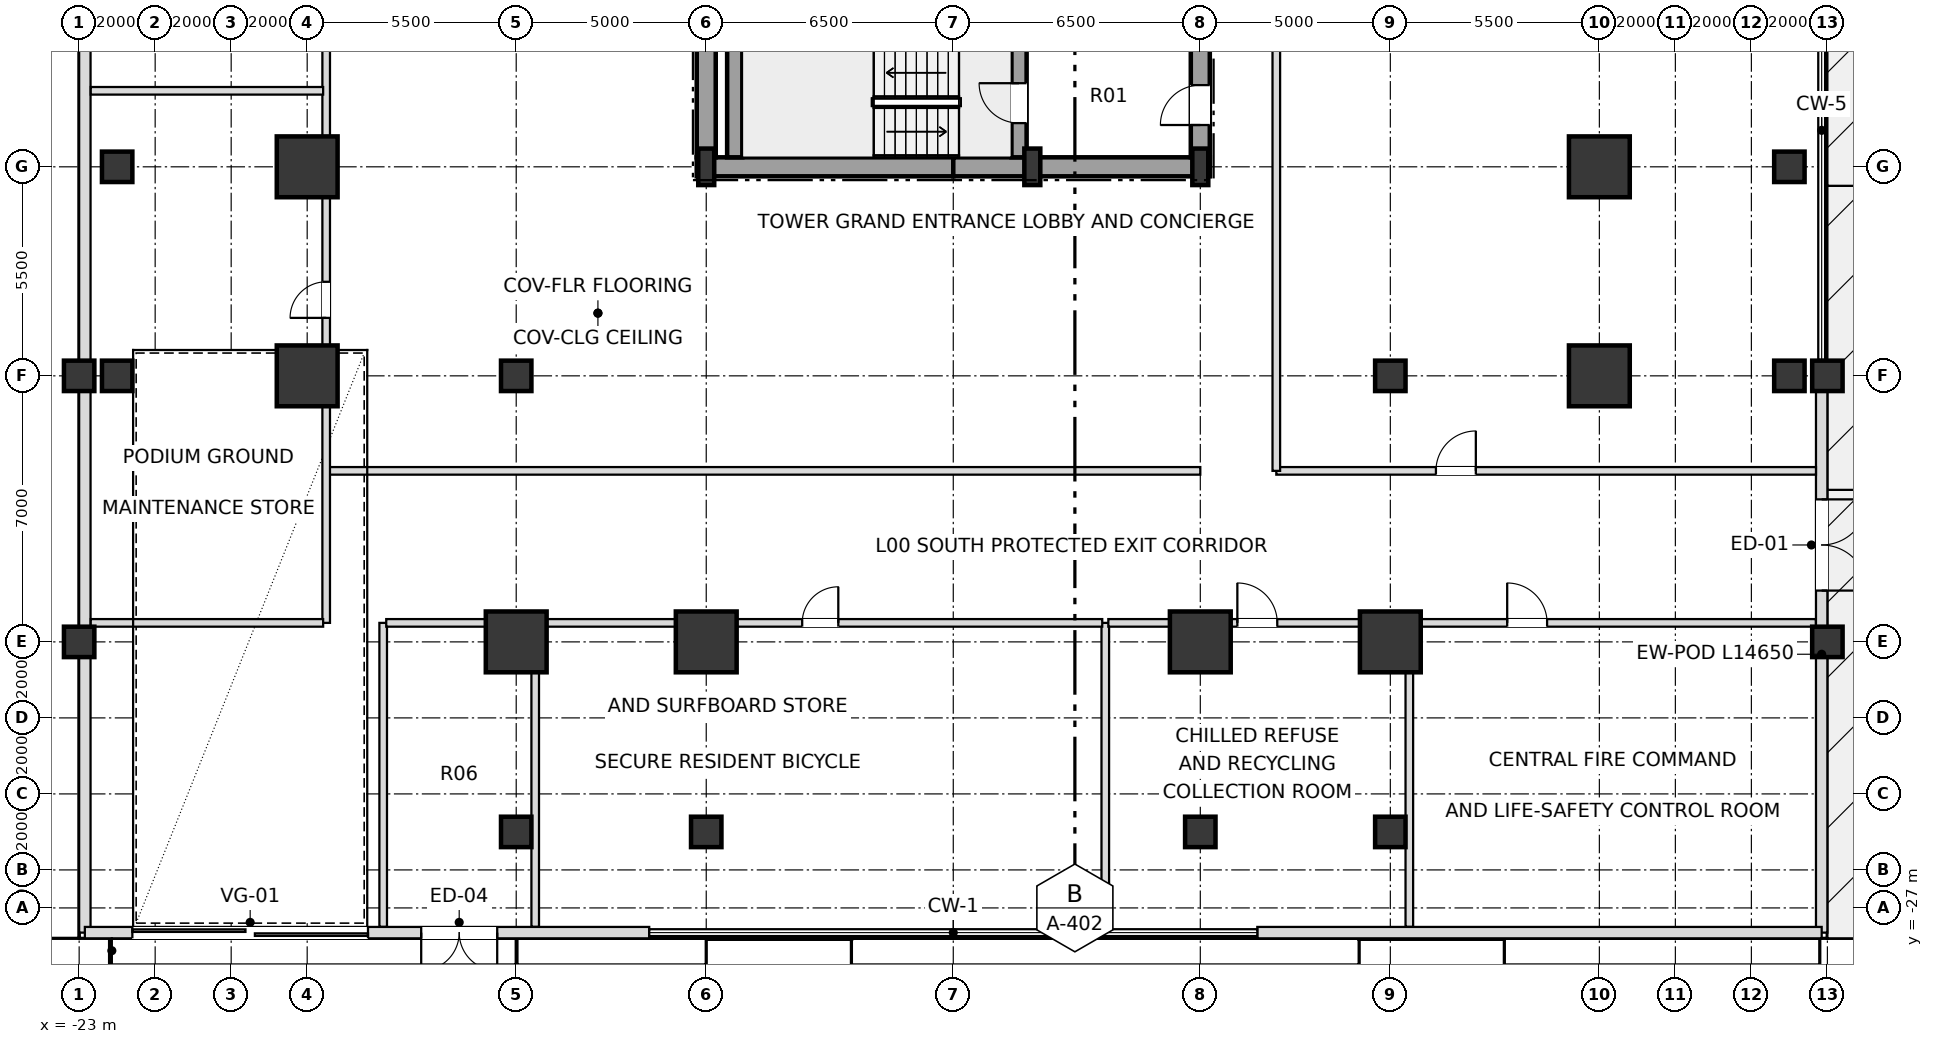
"""IFC4 building model, lengths in metres.
Left out: names, types, materials, properties, quantities, classifications, styles, units other than length and angle.
Written with IfcOpenShell. Run it as: python <this file> out.ifc"""

import sys

from ifc_helpers import new_model, si_unit, direction, frame, frame_2d, origin, origin_2d, place, context, subcontext, project, spatial, rectangle, i_section, extrude, element, fill, save


model = new_model("IFC4")
c1 = context("Model", 3, precision=1e-05, world=origin(), true_north=direction((0.0, 1.0)))
c2 = subcontext(c1, "Body", "Model", "MODEL_VIEW")
j1 = project(units=[si_unit("LENGTHUNIT", "METRE"), si_unit("PLANEANGLEUNIT", "RADIAN")], contexts=[c1])
p1 = place(None, origin())
s1 = spatial("IfcSite", under=j1, at=p1, CompositionType="ELEMENT")
p2 = place(p1, origin())
s2 = spatial("IfcBuilding", under=s1, at=p2, CompositionType="ELEMENT")
p3 = place(p2, origin())
s3 = spatial("IfcBuildingStorey", under=s2, at=p3, CompositionType="ELEMENT", Elevation=0.0)
for number, where, z_axis, x_axis in (
    (1, (-6.5, -7.5, 0.0), (0.0, 0.0, 1.0), (1.0, 0.0, 0.0)),
    (2, (2.08, -7.5, 0.0), (0.0, 0.0, 1.0), (1.0, 0.0, 0.0)),
    (3, (6.5, -7.5, 0.0), (0.0, 0.0, 1.0), (1.0, 0.0, 0.0)),
):
    element("IfcColumn", number, at=place(p3, frame(where, z_axis=z_axis, x_axis=x_axis)), inside=s3, PredefinedType="COLUMN", context=c2, shape_type="SweptSolid", body=[
        extrude(i_section(OverallWidth=0.42, OverallDepth=0.96, WebThickness=0.022, FlangeThickness=0.034, at=origin_2d()), origin(), (0.0, 0.0, 1.0), 6.0),
    ])
for number, where, z_axis, x_axis in (
    (4, (-11.5, -20.0, 0.0), (0.0, 0.0, 1.0), (1.0, 0.0, 0.0)),
    (5, (-6.5, -20.0, 0.0), (0.0, 0.0, 1.0), (1.0, 0.0, 0.0)),
    (6, (6.5, -20.0, 0.0), (0.0, 0.0, 1.0), (1.0, 0.0, 0.0)),
    (7, (11.5, -20.0, 0.0), (0.0, 0.0, 1.0), (1.0, 0.0, 0.0)),
    (8, (17.0, -13.0, 0.0), (0.0, 0.0, 1.0), (1.0, 0.0, 0.0)),
    (9, (17.0, -7.5, 0.0), (0.0, 0.0, 1.0), (1.0, 0.0, 0.0)),
    (10, (-17.0, -7.5, 0.0), (0.0, 0.0, 1.0), (1.0, 0.0, 0.0)),
    (11, (-17.0, -13.0, 0.0), (0.0, 0.0, 1.0), (1.0, 0.0, 0.0)),
):
    element("IfcColumn", number, at=place(p3, frame(where, z_axis=z_axis, x_axis=x_axis)), inside=s3, PredefinedType="USERDEFINED", context=c2, shape_type="SweptSolid", body=[
        extrude(rectangle(XDim=1.6, YDim=1.6, at=origin_2d()), origin(), (0.0, 0.0, 1.0), 6.0),
    ])
for number, where, z_axis, x_axis in (
    (12, (-23.0, -20.0, 0.0), (0.0, 0.0, 1.0), (1.0, 0.0, 0.0)),
    (13, (-23.0, -13.0, 0.0), (0.0, 0.0, 1.0), (1.0, 0.0, 0.0)),
    (14, (23.0, -20.0, 0.0), (0.0, 0.0, 1.0), (1.0, 0.0, 0.0)),
    (15, (23.0, -13.0, 0.0), (0.0, 0.0, 1.0), (1.0, 0.0, 0.0)),
    (16, (-11.5, -13.0, 0.0), (0.0, 0.0, 1.0), (1.0, 0.0, 0.0)),
    (17, (11.5, -13.0, 0.0), (0.0, 0.0, 1.0), (1.0, 0.0, 0.0)),
    (18, (-11.5, -25.0, 0.0), (0.0, 0.0, 1.0), (1.0, 0.0, 0.0)),
    (19, (-6.5, -25.0, 0.0), (0.0, 0.0, 1.0), (1.0, 0.0, 0.0)),
    (20, (6.5, -25.0, 0.0), (0.0, 0.0, 1.0), (1.0, 0.0, 0.0)),
    (21, (11.5, -25.0, 0.0), (0.0, 0.0, 1.0), (1.0, 0.0, 0.0)),
    (22, (-22.0, -13.0, 0.0), (0.0, 0.0, 1.0), (1.0, 0.0, 0.0)),
    (23, (-22.0, -7.5, 0.0), (0.0, 0.0, 1.0), (1.0, 0.0, 0.0)),
    (24, (22.0, -13.0, 0.0), (0.0, 0.0, 1.0), (1.0, 0.0, 0.0)),
    (25, (22.0, -7.5, 0.0), (0.0, 0.0, 1.0), (1.0, 0.0, 0.0)),
):
    element("IfcColumn", number, at=place(p3, frame(where, z_axis=z_axis, x_axis=x_axis)), inside=s3, PredefinedType="COLUMN", context=c2, shape_type="SweptSolid", body=[
        extrude(rectangle(XDim=0.8, YDim=0.8, at=origin_2d()), origin(), (0.0, 0.0, 1.0), 6.0),
    ])
p4 = place(p3, frame((-22.85, 27.65, 0.0), z_axis=(0.0, 0.0, 1.0), x_axis=(0.0, -1.0, 0.0)))
e26 = element("IfcWall", 26, at=p4, inside=s3, PredefinedType="SOLIDWALL", context=c2, shape_type="SweptSolid", body=[
    extrude(rectangle(XDim=55.3, YDim=0.3, at=frame_2d((27.65, 0.0))), origin(), (0.0, 0.0, 1.0), 5.076),
])
p5 = place(p4, frame((21.0, 0.0, 0.0)))
e27 = element("IfcOpeningElement", 27, at=p5, cuts=e26, PredefinedType="OPENING", context=c2, shape_type="SweptSolid", body=[
    extrude(rectangle(XDim=4.2, YDim=3.4, at=frame_2d((2.1, 1.7))), frame((0.0, 0.16, 0.0), z_axis=(0.0, -1.0, 0.0), x_axis=(1.0, 0.0, 0.0)), (0.0, 0.0, 1.0), 0.32),
])
p6 = place(p3, frame((22.85, -13.0, 0.0), z_axis=(0.0, 0.0, 1.0), x_axis=(0.0, -1.0, 0.0)))
e28 = element("IfcWall", 28, at=p6, inside=s3, PredefinedType="SOLIDWALL", context=c2, shape_type="SweptSolid", body=[
    extrude(rectangle(XDim=14.65, YDim=0.3, at=frame_2d((7.325, 0.0))), origin(), (0.0, 0.0, 1.0), 5.076),
])
p7 = place(p6, frame((3.25, 0.0, 0.0)))
e29 = element("IfcOpeningElement", 29, at=p7, cuts=e28, PredefinedType="OPENING", context=c2, shape_type="SweptSolid", body=[
    extrude(rectangle(XDim=2.4, YDim=2.6, at=frame_2d((1.2, 1.3))), frame((0.0, 0.16, 0.0), z_axis=(0.0, -1.0, 0.0), x_axis=(1.0, 0.0, 0.0)), (0.0, 0.0, 1.0), 0.32),
])
p8 = place(p3, frame((-8.0, -27.65, 0.0), z_axis=(0.0, 0.0, 1.0), x_axis=(-1.0, 0.0, 0.0)))
e30 = element("IfcWall", 30, at=p8, inside=s3, PredefinedType="SOLIDWALL", context=c2, shape_type="SweptSolid", body=[
    extrude(rectangle(XDim=14.85, YDim=0.3, at=frame_2d((7.425, 0.0))), origin(), (0.0, 0.0, 1.0), 5.72),
])
p9 = place(p8, frame((4.0, 0.0, 0.0)))
e31 = element("IfcOpeningElement", 31, at=p9, cuts=e30, PredefinedType="OPENING", context=c2, shape_type="SweptSolid", body=[
    extrude(rectangle(XDim=2.0, YDim=2.2, at=frame_2d((1.0, 1.1))), frame((0.0, 0.16, 0.0), z_axis=(0.0, -1.0, 0.0), x_axis=(1.0, 0.0, 0.0)), (0.0, 0.0, 1.0), 0.32),
])
p10 = place(p8, frame((7.4, 0.0, 0.0)))
e32 = element("IfcOpeningElement", 32, at=p10, cuts=e30, PredefinedType="OPENING", context=c2, shape_type="SweptSolid", body=[
    extrude(rectangle(XDim=6.2, YDim=2.8, at=frame_2d((3.1, 1.4))), frame((0.0, 0.16, 0.0), z_axis=(0.0, -1.0, 0.0), x_axis=(1.0, 0.0, 0.0)), (0.0, 0.0, 1.0), 0.32),
])
p11 = place(p3, frame((22.85, -27.65, 0.0), z_axis=(0.0, 0.0, 1.0), x_axis=(-1.0, 0.0, 0.0)))
e33 = element("IfcWall", 33, at=p11, inside=s3, PredefinedType="SOLIDWALL", context=c2, shape_type="SweptSolid", body=[
    extrude(rectangle(XDim=14.85, YDim=0.3, at=frame_2d((7.425, 0.0))), origin(), (0.0, 0.0, 1.0), 5.72),
])
for number, where, z_axis, x_axis in (
    (34, (-6.75, -7.5, 0.0), (0.0, 0.0, 1.0), (1.0, 0.0, 0.0)),
    (35, (0.0, -7.5, 0.0), (0.0, 0.0, 1.0), (1.0, 0.0, 0.0)),
):
    element("IfcWall", number, at=place(p3, frame(where, z_axis=z_axis, x_axis=x_axis)), inside=s3, PredefinedType="SHEAR", context=c2, shape_type="SweptSolid", body=[
        extrude(rectangle(XDim=6.75, YDim=0.5, at=frame_2d((3.375, 0.0))), origin(), (0.0, 0.0, 1.0), 5.72),
    ])
p12 = place(p3, frame((-6.5, -7.25, 0.0), z_axis=(0.0, 0.0, 1.0), x_axis=(0.0, 1.0, 0.0)))
e36 = element("IfcWall", 36, at=p12, inside=s3, PredefinedType="SHEAR", context=c2, shape_type="SweptSolid", body=[
    extrude(rectangle(XDim=3.55, YDim=0.5, at=frame_2d((1.775, 0.0))), origin(), (0.0, 0.0, 1.0), 5.72),
])
p13 = place(p3, frame((6.5, -7.25, 0.0), z_axis=(0.0, 0.0, 1.0), x_axis=(0.0, 1.0, 0.0)))
e37 = element("IfcWall", 37, at=p13, inside=s3, PredefinedType="SHEAR", context=c2, shape_type="SweptSolid", body=[
    extrude(rectangle(XDim=5.75, YDim=0.5, at=frame_2d((2.875, 0.0))), origin(), (0.0, 0.0, 1.0), 5.72),
])
p14 = place(p13, frame((0.85, 0.0, 0.0)))
e38 = element("IfcOpeningElement", 38, at=p14, cuts=e37, PredefinedType="OPENING", context=c2, shape_type="SweptSolid", body=[
    extrude(rectangle(XDim=1.05, YDim=2.15, at=frame_2d((0.525, 1.075))), frame((0.0, 0.26, 0.0), z_axis=(0.0, -1.0, 0.0), x_axis=(1.0, 0.0, 0.0)), (0.0, 0.0, 1.0), 0.52),
])
p15 = place(p3, frame((-5.75, -7.25, 0.0), z_axis=(0.0, 0.0, 1.0), x_axis=(0.0, 1.0, 0.0)))
e39 = element("IfcWall", 39, at=p15, inside=s3, PredefinedType="SHEAR", context=c2, shape_type="SweptSolid", body=[
    extrude(rectangle(XDim=2.9, YDim=0.4, at=frame_2d((1.45, 0.0))), origin(), (0.0, 0.0, 1.0), 5.72),
])
p16 = place(p3, frame((1.73, -7.25, 0.0), z_axis=(0.0, 0.0, 1.0), x_axis=(0.0, 1.0, 0.0)))
e40 = element("IfcWall", 40, at=p16, inside=s3, PredefinedType="SHEAR", context=c2, shape_type="SweptSolid", body=[
    extrude(rectangle(XDim=3.3, YDim=0.4, at=frame_2d((1.65, 0.0))), origin(), (0.0, 0.0, 1.0), 5.72),
])
p17 = place(p16, frame((0.9, 0.0, 0.0)))
e41 = element("IfcOpeningElement", 41, at=p17, cuts=e40, PredefinedType="OPENING", context=c2, shape_type="SweptSolid", body=[
    extrude(rectangle(XDim=1.05, YDim=2.15, at=frame_2d((0.525, 1.075))), frame((0.0, 0.21, 0.0), z_axis=(0.0, -1.0, 0.0), x_axis=(1.0, 0.0, 0.0)), (0.0, 0.0, 1.0), 0.42),
])
p18 = place(p3, frame((-16.5, -15.5, 0.0), z_axis=(0.0, 0.0, 1.0), x_axis=(1.0, 0.0, 0.0)))
e42 = element("IfcWall", 42, at=p18, inside=s3, PredefinedType="SOLIDWALL", context=c2, shape_type="SweptSolid", body=[
    extrude(rectangle(XDim=23.0, YDim=0.2, at=frame_2d((11.5, 0.0))), origin(), (0.0, 0.0, 1.0), 5.01),
])
p19 = place(p3, frame((8.5, -15.5, 0.0), z_axis=(0.0, 0.0, 1.0), x_axis=(1.0, 0.0, 0.0)))
e43 = element("IfcWall", 43, at=p19, inside=s3, PredefinedType="SOLIDWALL", context=c2, shape_type="SweptSolid", body=[
    extrude(rectangle(XDim=14.2, YDim=0.2, at=frame_2d((7.1, 0.0))), origin(), (0.0, 0.0, 1.0), 5.01),
])
p20 = place(p19, frame((4.2, 0.0, 0.0)))
e44 = element("IfcOpeningElement", 44, at=p20, cuts=e43, PredefinedType="OPENING", context=c2, shape_type="SweptSolid", body=[
    extrude(rectangle(XDim=1.05, YDim=2.15, at=frame_2d((0.525, 1.075))), frame((0.0, 0.11, 0.0), z_axis=(0.0, -1.0, 0.0), x_axis=(1.0, 0.0, 0.0)), (0.0, 0.0, 1.0), 0.22),
])
p21 = place(p3, frame((8.5, -15.5, 0.0), z_axis=(0.0, 0.0, 1.0), x_axis=(0.0, 1.0, 0.0)))
e45 = element("IfcWall", 45, at=p21, inside=s3, PredefinedType="SOLIDWALL", context=c2, shape_type="SweptSolid", body=[
    extrude(rectangle(XDim=11.5, YDim=0.2, at=frame_2d((5.75, 0.0))), origin(), (0.0, 0.0, 1.0), 5.01),
])
p22 = place(p3, frame((-16.5, -19.5, 0.0), z_axis=(0.0, 0.0, 1.0), x_axis=(0.0, 1.0, 0.0)))
e46 = element("IfcWall", 46, at=p22, inside=s3, PredefinedType="SOLIDWALL", context=c2, shape_type="SweptSolid", body=[
    extrude(rectangle(XDim=39.0, YDim=0.2, at=frame_2d((19.5, 0.0))), origin(), (0.0, 0.0, 1.0), 5.01),
])
p23 = place(p22, frame((20.975, 0.0, 0.0)))
e47 = element("IfcOpeningElement", 47, at=p23, cuts=e46, PredefinedType="OPENING", context=c2, shape_type="SweptSolid", body=[
    extrude(rectangle(XDim=1.05, YDim=2.15, at=frame_2d((0.525, 1.075))), frame((0.0, 0.11, 0.0), z_axis=(0.0, -1.0, 0.0), x_axis=(1.0, 0.0, 0.0)), (0.0, 0.0, 1.0), 0.22),
])
p24 = place(p22, frame((8.025, 0.0, 0.0)))
e48 = element("IfcOpeningElement", 48, at=p24, cuts=e46, PredefinedType="OPENING", context=c2, shape_type="SweptSolid", body=[
    extrude(rectangle(XDim=0.95, YDim=2.15, at=frame_2d((0.475, 1.075))), frame((0.0, 0.11, 0.0), z_axis=(0.0, -1.0, 0.0), x_axis=(1.0, 0.0, 0.0)), (0.0, 0.0, 1.0), 0.22),
])
p25 = place(p22, frame((33.475, 0.0, 0.0)))
e49 = element("IfcOpeningElement", 49, at=p25, cuts=e46, PredefinedType="OPENING", context=c2, shape_type="SweptSolid", body=[
    extrude(rectangle(XDim=1.05, YDim=2.15, at=frame_2d((0.525, 1.075))), frame((0.0, 0.11, 0.0), z_axis=(0.0, -1.0, 0.0), x_axis=(1.0, 0.0, 0.0)), (0.0, 0.0, 1.0), 0.22),
])
for number, where, z_axis, x_axis in (
    (50, (-15.0, -27.495, 0.0), (0.0, 0.0, 1.0), (0.0, 1.0, 0.0)),
    (51, (-11.0, -27.495, 0.0), (0.0, 0.0, 1.0), (0.0, 1.0, 0.0)),
):
    element("IfcWall", number, at=place(p3, frame(where, z_axis=z_axis, x_axis=x_axis)), inside=s3, PredefinedType="SOLIDWALL", context=c2, shape_type="SweptSolid", body=[
        extrude(rectangle(XDim=7.995, YDim=0.2, at=frame_2d((3.998, 0.0))), origin(), (0.0, 0.0, 1.0), 5.076),
    ])
p26 = place(p3, frame((4.0, -27.555, 0.0), z_axis=(0.0, 0.0, 1.0), x_axis=(0.0, 1.0, 0.0)))
e52 = element("IfcWall", 52, at=p26, inside=s3, PredefinedType="SOLIDWALL", context=c2, shape_type="SweptSolid", body=[
    extrude(rectangle(XDim=8.055, YDim=0.2, at=frame_2d((4.027, 0.0))), origin(), (0.0, 0.0, 1.0), 5.076),
])
p27 = place(p3, frame((12.0, -27.495, 0.0), z_axis=(0.0, 0.0, 1.0), x_axis=(0.0, 1.0, 0.0)))
e53 = element("IfcWall", 53, at=p27, inside=s3, PredefinedType="SOLIDWALL", context=c2, shape_type="SweptSolid", body=[
    extrude(rectangle(XDim=7.995, YDim=0.2, at=frame_2d((3.998, 0.0))), origin(), (0.0, 0.0, 1.0), 5.076),
])
p28 = place(p3, frame((-22.695, -19.5, 0.0), z_axis=(0.0, 0.0, 1.0), x_axis=(1.0, 0.0, 0.0)))
e54 = element("IfcWall", 54, at=p28, inside=s3, PredefinedType="SOLIDWALL", context=c2, shape_type="SweptSolid", body=[
    extrude(rectangle(XDim=6.115, YDim=0.2, at=frame_2d((3.058, 0.0))), origin(), (0.0, 0.0, 1.0), 5.72),
])
p29 = place(p3, frame((-14.92, -19.5, 0.0), z_axis=(0.0, 0.0, 1.0), x_axis=(1.0, 0.0, 0.0)))
e55 = element("IfcWall", 55, at=p29, inside=s3, PredefinedType="SOLIDWALL", context=c2, shape_type="SweptSolid", body=[
    extrude(rectangle(XDim=3.84, YDim=0.2, at=frame_2d((1.92, 0.0))), origin(), (0.0, 0.0, 1.0), 5.72),
])
p30 = place(p3, frame((-10.92, -19.5, 0.0), z_axis=(0.0, 0.0, 1.0), x_axis=(1.0, 0.0, 0.0)))
e56 = element("IfcWall", 56, at=p30, inside=s3, PredefinedType="SOLIDWALL", context=c2, shape_type="SweptSolid", body=[
    extrude(rectangle(XDim=14.84, YDim=0.2, at=frame_2d((7.42, 0.0))), origin(), (0.0, 0.0, 1.0), 5.01),
])
p31 = place(p30, frame((6.945, 0.0, 0.0)))
e57 = element("IfcOpeningElement", 57, at=p31, cuts=e56, PredefinedType="OPENING", context=c2, shape_type="SweptSolid", body=[
    extrude(rectangle(XDim=0.95, YDim=2.15, at=frame_2d((0.475, 1.075))), frame((0.0, 0.11, 0.0), z_axis=(0.0, -1.0, 0.0), x_axis=(1.0, 0.0, 0.0)), (0.0, 0.0, 1.0), 0.22),
])
p32 = place(p3, frame((4.08, -19.5, 0.0), z_axis=(0.0, 0.0, 1.0), x_axis=(1.0, 0.0, 0.0)))
e58 = element("IfcWall", 58, at=p32, inside=s3, PredefinedType="SOLIDWALL", context=c2, shape_type="SweptSolid", body=[
    extrude(rectangle(XDim=7.84, YDim=0.2, at=frame_2d((3.92, 0.0))), origin(), (0.0, 0.0, 1.0), 5.01),
])
p33 = place(p32, frame((3.395, 0.0, 0.0)))
e59 = element("IfcOpeningElement", 59, at=p33, cuts=e58, PredefinedType="OPENING", context=c2, shape_type="SweptSolid", body=[
    extrude(rectangle(XDim=1.05, YDim=2.15, at=frame_2d((0.525, 1.075))), frame((0.0, 0.11, 0.0), z_axis=(0.0, -1.0, 0.0), x_axis=(1.0, 0.0, 0.0)), (0.0, 0.0, 1.0), 0.22),
])
p34 = place(p3, frame((12.08, -19.5, 0.0), z_axis=(0.0, 0.0, 1.0), x_axis=(1.0, 0.0, 0.0)))
e60 = element("IfcWall", 60, at=p34, inside=s3, PredefinedType="SOLIDWALL", context=c2, shape_type="SweptSolid", body=[
    extrude(rectangle(XDim=10.615, YDim=0.2, at=frame_2d((5.308, 0.0))), origin(), (0.0, 0.0, 1.0), 5.72),
])
p35 = place(p34, frame((2.495, 0.0, 0.0)))
e61 = element("IfcOpeningElement", 61, at=p35, cuts=e60, PredefinedType="OPENING", context=c2, shape_type="SweptSolid", body=[
    extrude(rectangle(XDim=1.05, YDim=2.15, at=frame_2d((0.525, 1.075))), frame((0.0, 0.11, 0.0), z_axis=(0.0, -1.0, 0.0), x_axis=(1.0, 0.0, 0.0)), (0.0, 0.0, 1.0), 0.22),
])
p36 = place(p3, frame((-22.695, -5.5, 0.0), z_axis=(0.0, 0.0, 1.0), x_axis=(1.0, 0.0, 0.0)))
e62 = element("IfcWall", 62, at=p36, inside=s3, PredefinedType="SOLIDWALL", context=c2, shape_type="SweptSolid", body=[
    extrude(rectangle(XDim=6.115, YDim=0.2, at=frame_2d((3.058, 0.0))), origin(), (0.0, 0.0, 1.0), 5.01),
])
p37 = place(p7, origin())
e63 = element("IfcDoor", 63, at=p37, inside=s3, OperationType="DOUBLE_DOOR_SINGLE_SWING", PredefinedType="DOOR", context=c2, shape_type="SweptSolid", body=[
    extrude(rectangle(XDim=2.4, YDim=2.6, at=frame_2d((1.2, 1.3))), frame((0.0, 0.025, 0.0), z_axis=(0.0, -1.0, 0.0), x_axis=(1.0, 0.0, 0.0)), (0.0, 0.0, 1.0), 0.05),
])
fill(e29, e63)
p38 = place(p9, origin())
e64 = element("IfcDoor", 64, at=p38, inside=s3, OperationType="DOUBLE_DOOR_SINGLE_SWING", PredefinedType="DOOR", context=c2, shape_type="SweptSolid", body=[
    extrude(rectangle(XDim=2.0, YDim=2.2, at=frame_2d((1.0, 1.1))), frame((0.0, 0.025, 0.0), z_axis=(0.0, -1.0, 0.0), x_axis=(1.0, 0.0, 0.0)), (0.0, 0.0, 1.0), 0.05),
])
fill(e31, e64)
p39 = place(p10, origin())
e65 = element("IfcDoor", 65, at=p39, inside=s3, OperationType="ROLLINGUP", PredefinedType="GATE", context=c2, shape_type="SweptSolid", body=[
    extrude(rectangle(XDim=6.2, YDim=2.8, at=frame_2d((3.1, 1.4))), frame((0.0, 0.025, 0.0), z_axis=(0.0, -1.0, 0.0), x_axis=(1.0, 0.0, 0.0)), (0.0, 0.0, 1.0), 0.05),
])
fill(e32, e65)
p40 = place(p14, origin())
e66 = element("IfcDoor", 66, at=p40, inside=s3, OperationType="SINGLE_SWING_LEFT", PredefinedType="DOOR", context=c2, shape_type="SweptSolid", body=[
    extrude(rectangle(XDim=1.05, YDim=2.15, at=frame_2d((0.525, 1.075))), frame((0.0, 0.025, 0.0), z_axis=(0.0, -1.0, 0.0), x_axis=(1.0, 0.0, 0.0)), (0.0, 0.0, 1.0), 0.05),
])
fill(e38, e66)
p41 = place(p17, origin())
e67 = element("IfcDoor", 67, at=p41, inside=s3, OperationType="SINGLE_SWING_RIGHT", PredefinedType="DOOR", context=c2, shape_type="SweptSolid", body=[
    extrude(rectangle(XDim=1.05, YDim=2.15, at=frame_2d((0.525, 1.075))), frame((0.0, 0.025, 0.0), z_axis=(0.0, -1.0, 0.0), x_axis=(1.0, 0.0, 0.0)), (0.0, 0.0, 1.0), 0.05),
])
fill(e41, e67)
p42 = place(p20, origin())
e68 = element("IfcDoor", 68, at=p42, inside=s3, OperationType="SINGLE_SWING_RIGHT", PredefinedType="DOOR", context=c2, shape_type="SweptSolid", body=[
    extrude(rectangle(XDim=1.05, YDim=2.15, at=frame_2d((0.525, 1.075))), frame((0.0, 0.025, 0.0), z_axis=(0.0, -1.0, 0.0), x_axis=(1.0, 0.0, 0.0)), (0.0, 0.0, 1.0), 0.05),
])
fill(e44, e68)
p43 = place(p35, origin())
e69 = element("IfcDoor", 69, at=p43, inside=s3, OperationType="SINGLE_SWING_LEFT", PredefinedType="DOOR", context=c2, shape_type="SweptSolid", body=[
    extrude(rectangle(XDim=1.05, YDim=2.15, at=frame_2d((0.525, 1.075))), frame((0.0, 0.025, 0.0), z_axis=(0.0, -1.0, 0.0), x_axis=(1.0, 0.0, 0.0)), (0.0, 0.0, 1.0), 0.05),
])
fill(e61, e69)
p44 = place(p31, origin())
e70 = element("IfcDoor", 70, at=p44, inside=s3, OperationType="SINGLE_SWING_RIGHT", PredefinedType="DOOR", context=c2, shape_type="SweptSolid", body=[
    extrude(rectangle(XDim=0.95, YDim=2.15, at=frame_2d((0.475, 1.075))), frame((0.0, 0.025, 0.0), z_axis=(0.0, -1.0, 0.0), x_axis=(1.0, 0.0, 0.0)), (0.0, 0.0, 1.0), 0.05),
])
fill(e57, e70)
p45 = place(p33, origin())
e71 = element("IfcDoor", 71, at=p45, inside=s3, OperationType="SINGLE_SWING_LEFT", PredefinedType="DOOR", context=c2, shape_type="SweptSolid", body=[
    extrude(rectangle(XDim=1.05, YDim=2.15, at=frame_2d((0.525, 1.075))), frame((0.0, 0.025, 0.0), z_axis=(0.0, -1.0, 0.0), x_axis=(1.0, 0.0, 0.0)), (0.0, 0.0, 1.0), 0.05),
])
fill(e59, e71)
p46 = place(p24, origin())
e72 = element("IfcDoor", 72, at=p46, inside=s3, OperationType="SINGLE_SWING_LEFT", PredefinedType="DOOR", context=c2, shape_type="SweptSolid", body=[
    extrude(rectangle(XDim=0.95, YDim=2.15, at=frame_2d((0.475, 1.075))), frame((0.0, 0.025, 0.0), z_axis=(0.0, -1.0, 0.0), x_axis=(1.0, 0.0, 0.0)), (0.0, 0.0, 1.0), 0.05),
])
fill(e48, e72)
save(model, sys.argv[1])
